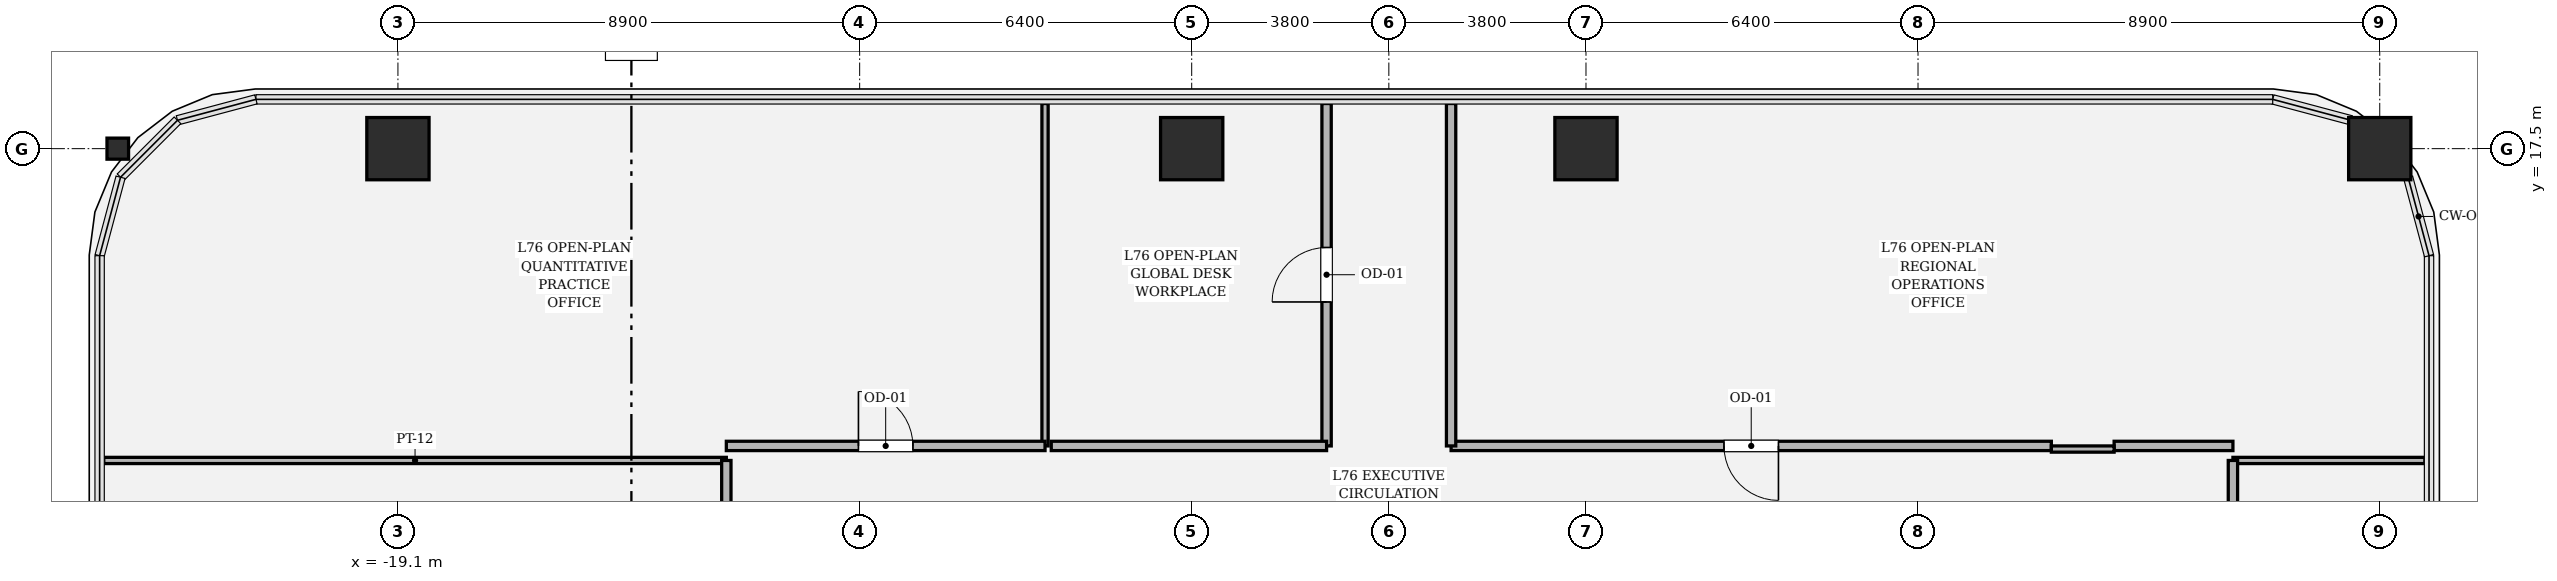
"""IFC4 building model, lengths in metres.
Left out: names, types, materials, properties, quantities, classifications, styles, units other than length and angle.
Written with IfcOpenShell. Run it as: python <this file> out.ifc"""

import sys

from ifc_helpers import new_model, si_unit, direction, frame, frame_2d, origin, origin_2d, place, context, subcontext, project, spatial, rectangle, hollow_rectangle, i_section, extrude, element, fill, save


model = new_model("IFC4")
c1 = context("Model", 3, precision=1e-05, world=origin(), true_north=direction((0.0, 1.0)))
c2 = subcontext(c1, "Body", "Model", "MODEL_VIEW")
j1 = project(units=[si_unit("LENGTHUNIT", "METRE"), si_unit("PLANEANGLEUNIT", "RADIAN")], contexts=[c1])
p1 = place(None, origin())
s1 = spatial("IfcSite", under=j1, at=p1, CompositionType="ELEMENT")
p2 = place(p1, origin())
s2 = spatial("IfcBuilding", under=s1, at=p2, CompositionType="ELEMENT")
p3 = place(p2, frame((0.0, 0.0, 321.6)))
s3 = spatial("IfcBuildingStorey", under=s2, at=p3, CompositionType="ELEMENT", Elevation=321.6)
for number, where, z_axis, x_axis in (
    (1, (19.1, 17.5, 0.0), (0.0, 0.0, 1.0), (1.0, 0.0, 0.0)),
    (2, (3.8, 17.5, 0.0), (0.0, 0.0, 1.0), (1.0, 0.0, 0.0)),
    (3, (-3.8, 17.5, 0.0), (0.0, 0.0, 1.0), (1.0, 0.0, 0.0)),
    (4, (-19.1, 17.5, 0.0), (0.0, 0.0, 1.0), (1.0, 0.0, 0.0)),
):
    element("IfcColumn", number, at=place(p3, frame(where, z_axis=z_axis, x_axis=x_axis)), inside=s3, PredefinedType="COLUMN", context=c2, shape_type="SweptSolid", body=[
        extrude(hollow_rectangle(XDim=1.2, YDim=1.2, WallThickness=0.035, at=origin_2d()), origin(), (0.0, 0.0, 1.0), 4.2),
    ])
p4 = place(p3, frame((-24.5, 17.5, 0.0), z_axis=(0.0, 0.0, 1.0), x_axis=(0.0, 1.0, 0.0)))
e5 = element("IfcColumn", 5, at=p4, inside=s3, PredefinedType="COLUMN", context=c2, shape_type="SweptSolid", body=[
    extrude(i_section(OverallWidth=0.406, OverallDepth=0.416, WebThickness=0.029, FlangeThickness=0.048, FilletRadius=0.018, at=origin_2d()), origin(), (0.0, 0.0, 1.0), 4.198),
])
p5 = place(p3, frame((-24.77, 11.49, 0.0), z_axis=(0.0, 0.0, 1.0), x_axis=(1.0, 0.0, 0.0)))
e6 = element("IfcWall", 6, at=p5, inside=s3, PredefinedType="PARTITIONING", context=c2, shape_type="SweptSolid", body=[
    extrude(rectangle(XDim=12.0, YDim=0.12, at=frame_2d((6.0, 0.0))), origin(), (0.0, 0.0, 1.0), 2.714),
])
p6 = place(p3, frame((-12.77, 11.49, 0.0), z_axis=(0.0, 0.0, 1.0), x_axis=(0.0, -1.0, 0.0)))
e7 = element("IfcWall", 7, at=p6, inside=s3, PredefinedType="PARTITIONING", context=c2, shape_type="SweptSolid", body=[
    extrude(rectangle(XDim=8.658, YDim=0.18, at=frame_2d((4.329, 0.0))), origin(), (0.0, 0.0, 1.0), 3.394),
])
p7 = place(p6, frame((3.804, 0.0, 0.0)))
e8 = element("IfcOpeningElement", 8, at=p7, cuts=e7, PredefinedType="OPENING", context=c2, shape_type="SweptSolid", body=[
    extrude(rectangle(XDim=1.05, YDim=2.2, at=frame_2d((0.525, 1.1))), frame((0.0, 0.1, 0.0), z_axis=(0.0, -1.0, 0.0), x_axis=(1.0, 0.0, 0.0)), (0.0, 0.0, 1.0), 0.2),
])
p8 = place(p3, frame((16.27, 11.49, 0.0), z_axis=(0.0, 0.0, 1.0), x_axis=(1.0, 0.0, 0.0)))
e9 = element("IfcWall", 9, at=p8, inside=s3, PredefinedType="PARTITIONING", context=c2, shape_type="SweptSolid", body=[
    extrude(rectangle(XDim=3.7, YDim=0.12, at=frame_2d((1.85, 0.0))), origin(), (0.0, 0.0, 1.0), 3.394),
])
p9 = place(p3, frame((16.27, 2.832, 0.0), z_axis=(0.0, 0.0, 1.0), x_axis=(0.0, 1.0, 0.0)))
e10 = element("IfcWall", 10, at=p9, inside=s3, PredefinedType="PARTITIONING", context=c2, shape_type="SweptSolid", body=[
    extrude(rectangle(XDim=8.658, YDim=0.18, at=frame_2d((4.329, 0.0))), origin(), (0.0, 0.0, 1.0), 3.394),
])
p10 = place(p9, frame((3.804, 0.0, 0.0)))
e11 = element("IfcOpeningElement", 11, at=p10, cuts=e10, PredefinedType="OPENING", context=c2, shape_type="SweptSolid", body=[
    extrude(rectangle(XDim=1.05, YDim=2.2, at=frame_2d((0.525, 1.1))), frame((0.0, 0.1, 0.0), z_axis=(0.0, -1.0, 0.0), x_axis=(1.0, 0.0, 0.0)), (0.0, 0.0, 1.0), 0.2),
])
p11 = place(p3, frame((-6.627, 18.37, 0.0), z_axis=(0.0, 0.0, 1.0), x_axis=(0.0, -1.0, 0.0)))
e12 = element("IfcWall", 12, at=p11, inside=s3, PredefinedType="PARTITIONING", context=c2, shape_type="SweptSolid", body=[
    extrude(rectangle(XDim=6.6, YDim=0.12, at=frame_2d((3.3, 0.0))), origin(), (0.0, 0.0, 1.0), 3.394),
])
p12 = place(p3, frame((-6.627, 11.77, 0.0), z_axis=(0.0, 0.0, 1.0), x_axis=(-1.0, 0.0, 0.0)))
e13 = element("IfcWall", 13, at=p12, inside=s3, PredefinedType="PARTITIONING", context=c2, shape_type="SweptSolid", body=[
    extrude(rectangle(XDim=6.143, YDim=0.18, at=frame_2d((3.072, 0.0))), origin(), (0.0, 0.0, 1.0), 3.394),
])
p13 = place(p12, frame((2.546, 0.0, 0.0)))
e14 = element("IfcOpeningElement", 14, at=p13, cuts=e13, PredefinedType="OPENING", context=c2, shape_type="SweptSolid", body=[
    extrude(rectangle(XDim=1.05, YDim=2.2, at=frame_2d((0.525, 1.1))), frame((0.0, 0.1, 0.0), z_axis=(0.0, -1.0, 0.0), x_axis=(1.0, 0.0, 0.0)), (0.0, 0.0, 1.0), 0.2),
])
p14 = place(p3, frame((12.77, 11.77, 0.0), z_axis=(0.0, 0.0, 1.0), x_axis=(-1.0, 0.0, 0.0)))
e15 = element("IfcWall", 15, at=p14, inside=s3, PredefinedType="PARTITIONING", context=c2, shape_type="SweptSolid", body=[
    extrude(rectangle(XDim=11.57, YDim=0.18, at=frame_2d((5.785, 0.0))), origin(), (0.0, 0.0, 1.0), 3.394),
])
p15 = place(p14, frame((5.26, 0.0, 0.0)))
e16 = element("IfcOpeningElement", 16, at=p15, cuts=e15, PredefinedType="OPENING", context=c2, shape_type="SweptSolid", body=[
    extrude(rectangle(XDim=1.05, YDim=2.2, at=frame_2d((0.525, 1.1))), frame((0.0, 0.1, 0.0), z_axis=(0.0, -1.0, 0.0), x_axis=(1.0, 0.0, 0.0)), (0.0, 0.0, 1.0), 0.2),
])
p16 = place(p3, frame((1.2, 11.77, 0.0), z_axis=(0.0, 0.0, 1.0), x_axis=(0.0, 1.0, 0.0)))
e17 = element("IfcWall", 17, at=p16, inside=s3, PredefinedType="PARTITIONING", context=c2, shape_type="SweptSolid", body=[
    extrude(rectangle(XDim=6.6, YDim=0.18, at=frame_2d((3.3, 0.0))), origin(), (0.0, 0.0, 1.0), 3.394),
])
p17 = place(p3, frame((16.27, 11.77, 0.0), z_axis=(0.0, 0.0, 1.0), x_axis=(-1.0, 0.0, 0.0)))
e18 = element("IfcWall", 18, at=p17, inside=s3, PredefinedType="PARTITIONING", context=c2, shape_type="SweptSolid", body=[
    extrude(rectangle(XDim=2.29, YDim=0.18, at=frame_2d((1.145, 0.0))), origin(), (0.0, 0.0, 1.0), 3.634),
])
p18 = place(p3, frame((13.98, 11.71, 0.0), z_axis=(0.0, 0.0, 1.0), x_axis=(-1.0, 0.0, 0.0)))
e19 = element("IfcWall", 19, at=p18, inside=s3, PredefinedType="PARTITIONING", context=c2, shape_type="SweptSolid", body=[
    extrude(rectangle(XDim=1.21, YDim=0.12, at=frame_2d((0.605, 0.0))), origin(), (0.0, 0.0, 1.0), 4.0),
])
p19 = place(p3, frame((-1.2, 18.37, 0.0), z_axis=(0.0, 0.0, 1.0), x_axis=(0.0, -1.0, 0.0)))
e20 = element("IfcWall", 20, at=p19, inside=s3, PredefinedType="PARTITIONING", context=c2, shape_type="SweptSolid", body=[
    extrude(rectangle(XDim=6.6, YDim=0.18, at=frame_2d((3.3, 0.0))), origin(), (0.0, 0.0, 1.0), 3.394),
])
p20 = place(p19, frame((2.775, 0.0, 0.0)))
e21 = element("IfcOpeningElement", 21, at=p20, cuts=e20, PredefinedType="OPENING", context=c2, shape_type="SweptSolid", body=[
    extrude(rectangle(XDim=1.05, YDim=2.2, at=frame_2d((0.525, 1.1))), frame((0.0, 0.1, 0.0), z_axis=(0.0, -1.0, 0.0), x_axis=(1.0, 0.0, 0.0)), (0.0, 0.0, 1.0), 0.2),
])
p21 = place(p3, frame((-1.2, 11.77, 0.0), z_axis=(0.0, 0.0, 1.0), x_axis=(-1.0, 0.0, 0.0)))
e22 = element("IfcWall", 22, at=p21, inside=s3, PredefinedType="PARTITIONING", context=c2, shape_type="SweptSolid", body=[
    extrude(rectangle(XDim=5.307, YDim=0.18, at=frame_2d((2.654, 0.0))), origin(), (0.0, 0.0, 1.0), 3.394),
])
p22 = place(p13, origin())
e23 = element("IfcDoor", 23, at=p22, inside=s3, OperationType="SINGLE_SWING_RIGHT", PredefinedType="DOOR", context=c2, shape_type="SweptSolid", body=[
    extrude(rectangle(XDim=1.05, YDim=2.2, at=frame_2d((0.525, 1.1))), frame((0.0, 0.025, 0.0), z_axis=(0.0, -1.0, 0.0), x_axis=(1.0, 0.0, 0.0)), (0.0, 0.0, 1.0), 0.05),
])
fill(e14, e23)
p23 = place(p15, origin())
e24 = element("IfcDoor", 24, at=p23, inside=s3, OperationType="SINGLE_SWING_LEFT", PredefinedType="DOOR", context=c2, shape_type="SweptSolid", body=[
    extrude(rectangle(XDim=1.05, YDim=2.2, at=frame_2d((0.525, 1.1))), frame((0.0, 0.025, 0.0), z_axis=(0.0, -1.0, 0.0), x_axis=(1.0, 0.0, 0.0)), (0.0, 0.0, 1.0), 0.05),
])
fill(e16, e24)
p24 = place(p20, origin())
e25 = element("IfcDoor", 25, at=p24, inside=s3, OperationType="SINGLE_SWING_RIGHT", PredefinedType="DOOR", context=c2, shape_type="SweptSolid", body=[
    extrude(rectangle(XDim=1.05, YDim=2.2, at=frame_2d((0.525, 1.1))), frame((0.0, 0.025, 0.0), z_axis=(0.0, -1.0, 0.0), x_axis=(1.0, 0.0, 0.0)), (0.0, 0.0, 1.0), 0.05),
])
fill(e21, e25)
save(model, sys.argv[1])
